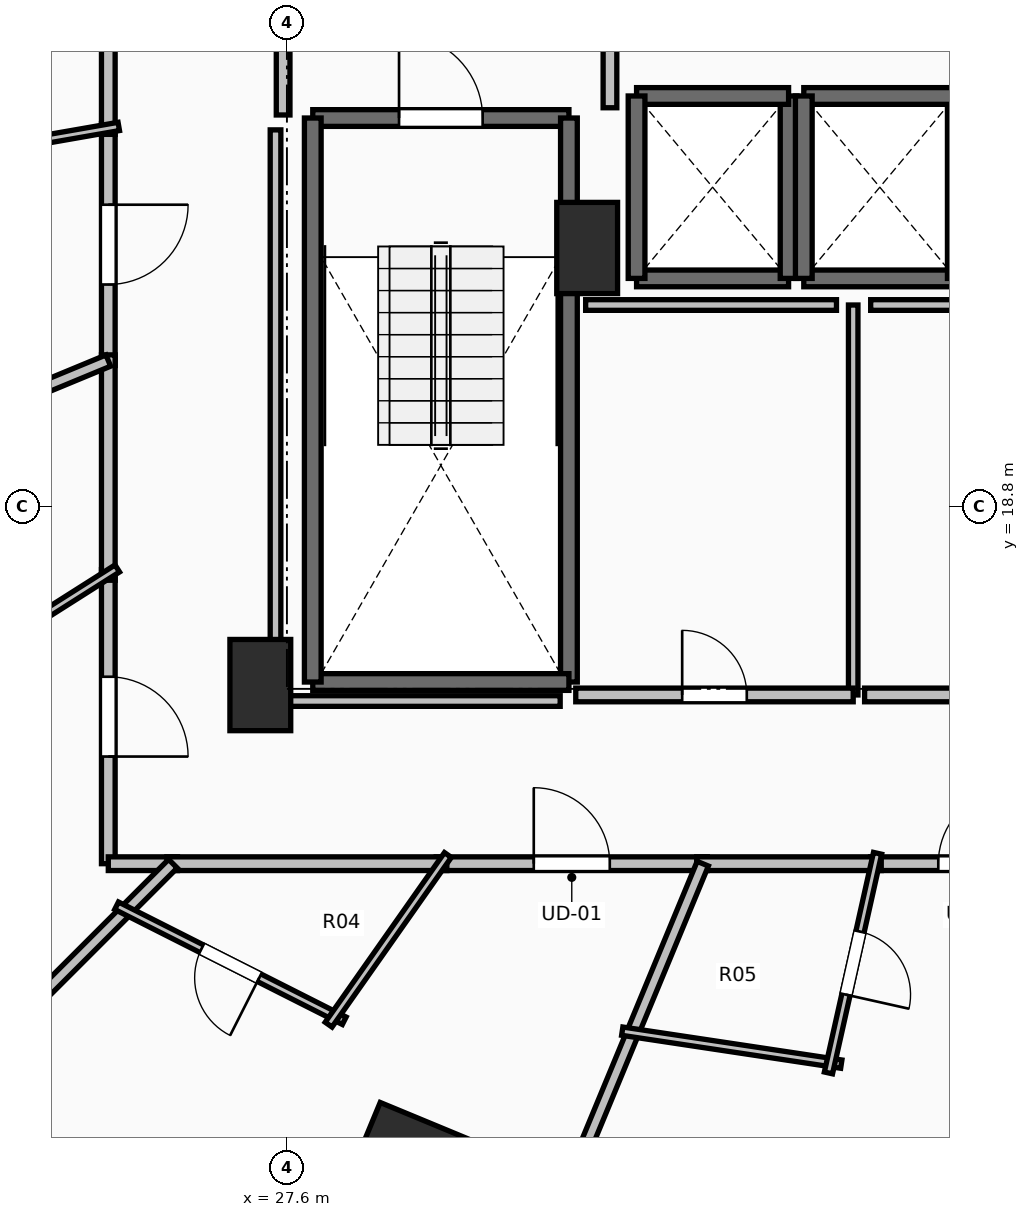
"""IFC4 building model, lengths in metres.
Left out: names, types, materials, properties, quantities, classifications, styles, units other than length and angle.
Written with IfcOpenShell. Run it as: python <this file> out.ifc"""

import sys

from ifc_helpers import new_model, si_unit, direction, frame, frame_2d, origin, origin_2d, place, context, subcontext, project, spatial, rectangle, extrude, element, fill, save


model = new_model("IFC4")
c1 = context("Model", 3, precision=1e-05, world=origin(), true_north=direction((0.0, 1.0)))
c2 = subcontext(c1, "Body", "Model", "MODEL_VIEW")
j1 = project(units=[si_unit("LENGTHUNIT", "METRE"), si_unit("PLANEANGLEUNIT", "RADIAN")], contexts=[c1])
p1 = place(None, origin())
s1 = spatial("IfcSite", under=j1, at=p1, CompositionType="ELEMENT")
p2 = place(p1, origin())
s2 = spatial("IfcBuilding", under=s1, at=p2, CompositionType="ELEMENT")
p3 = place(p2, frame((0.0, 0.0, 31.0)))
s3 = spatial("IfcBuildingStorey", under=s2, at=p3, CompositionType="ELEMENT", Elevation=31.0)
p4 = place(p3, frame((29.179, 10.109, 0.0), z_axis=(0.0, 0.0, 1.0), x_axis=(-0.382683432365, -0.923879532511, 0.0)))
e1 = element("IfcColumn", 1, at=p4, inside=s3, PredefinedType="COLUMN", context=c2, shape_type="SweptSolid", body=[
    extrude(rectangle(XDim=1.3, YDim=1.3, at=origin_2d()), origin(), (0.0, 0.0, 1.0), 3.5),
])
for number, where, z_axis, x_axis in (
    (2, (27.25, 16.45, 0.0), (0.0, 0.0, 1.0), (1.0, 0.0, 0.0)),
    (3, (31.55, 22.2, 0.0), (0.0, 0.0, 1.0), (1.0, 0.0, 0.0)),
):
    element("IfcColumn", number, at=place(p3, frame(where, z_axis=z_axis, x_axis=x_axis)), inside=s3, PredefinedType="PILASTER", context=c2, shape_type="SweptSolid", body=[
        extrude(rectangle(XDim=0.8, YDim=1.2, at=origin_2d()), origin(), (0.0, 0.0, 1.0), 3.5),
    ])
p5 = place(p3, frame((27.94, 23.91, 0.0), z_axis=(0.0, 0.0, 1.0), x_axis=(1.0, 0.0, 0.0)))
e4 = element("IfcWall", 4, at=p5, inside=s3, PredefinedType="SOLIDWALL", context=c2, shape_type="SweptSolid", body=[
    extrude(rectangle(XDim=3.37, YDim=0.22, at=frame_2d((1.685, 0.0))), origin(), (0.0, 0.0, 1.0), 3.24),
])
p6 = place(p5, frame((1.135, 0.0, 0.0)))
e5 = element("IfcOpeningElement", 5, at=p6, cuts=e4, PredefinedType="OPENING", context=c2, shape_type="SweptSolid", body=[
    extrude(rectangle(XDim=1.1, YDim=2.15, at=frame_2d((0.55, 1.075))), frame((0.0, 0.125, 0.0), z_axis=(0.0, -1.0, 0.0), x_axis=(1.0, 0.0, 0.0)), (0.0, 0.0, 1.0), 0.25),
])
p7 = place(p3, frame((31.31, 23.91, 0.0), z_axis=(0.0, 0.0, 1.0), x_axis=(0.0, -1.0, 0.0)))
e6 = element("IfcWall", 6, at=p7, inside=s3, PredefinedType="SOLIDWALL", context=c2, shape_type="SweptSolid", body=[
    extrude(rectangle(XDim=7.42, YDim=0.22, at=frame_2d((3.71, 0.0))), origin(), (0.0, 0.0, 1.0), 3.24),
])
p8 = place(p3, frame((31.31, 16.49, 0.0), z_axis=(0.0, 0.0, 1.0), x_axis=(-1.0, 0.0, 0.0)))
e7 = element("IfcWall", 7, at=p8, inside=s3, PredefinedType="SOLIDWALL", context=c2, shape_type="SweptSolid", body=[
    extrude(rectangle(XDim=3.37, YDim=0.22, at=frame_2d((1.685, 0.0))), origin(), (0.0, 0.0, 1.0), 3.24),
])
p9 = place(p3, frame((27.94, 16.49, 0.0), z_axis=(0.0, 0.0, 1.0), x_axis=(0.0, 1.0, 0.0)))
e8 = element("IfcWall", 8, at=p9, inside=s3, PredefinedType="SOLIDWALL", context=c2, shape_type="SweptSolid", body=[
    extrude(rectangle(XDim=7.42, YDim=0.22, at=frame_2d((3.71, 0.0))), origin(), (0.0, 0.0, 1.0), 3.24),
])
p10 = place(p3, frame((32.2, 21.8, 0.0), z_axis=(0.0, 0.0, 1.0), x_axis=(1.0, 0.0, 0.0)))
e9 = element("IfcWall", 9, at=p10, inside=s3, PredefinedType="SOLIDWALL", context=c2, shape_type="SweptSolid", body=[
    extrude(rectangle(XDim=2.0, YDim=0.22, at=frame_2d((1.0, 0.0))), origin(), (0.0, 0.0, 1.0), 3.24),
])
p11 = place(p3, frame((34.2, 21.8, 0.0), z_axis=(0.0, 0.0, 1.0), x_axis=(0.0, 1.0, 0.0)))
e10 = element("IfcWall", 10, at=p11, inside=s3, PredefinedType="SOLIDWALL", context=c2, shape_type="SweptSolid", body=[
    extrude(rectangle(XDim=2.4, YDim=0.22, at=frame_2d((1.2, 0.0))), origin(), (0.0, 0.0, 1.0), 3.24),
])
p12 = place(p3, frame((34.2, 24.2, 0.0), z_axis=(0.0, 0.0, 1.0), x_axis=(-1.0, 0.0, 0.0)))
e11 = element("IfcWall", 11, at=p12, inside=s3, PredefinedType="SOLIDWALL", context=c2, shape_type="SweptSolid", body=[
    extrude(rectangle(XDim=2.0, YDim=0.22, at=frame_2d((1.0, 0.0))), origin(), (0.0, 0.0, 1.0), 3.24),
])
p13 = place(p3, frame((32.2, 24.2, 0.0), z_axis=(0.0, 0.0, 1.0), x_axis=(0.0, -1.0, 0.0)))
e12 = element("IfcWall", 12, at=p13, inside=s3, PredefinedType="SOLIDWALL", context=c2, shape_type="SweptSolid", body=[
    extrude(rectangle(XDim=2.4, YDim=0.22, at=frame_2d((1.2, 0.0))), origin(), (0.0, 0.0, 1.0), 3.24),
])
p14 = place(p3, frame((34.4, 21.8, 0.0), z_axis=(0.0, 0.0, 1.0), x_axis=(1.0, 0.0, 0.0)))
e13 = element("IfcWall", 13, at=p14, inside=s3, PredefinedType="SOLIDWALL", context=c2, shape_type="SweptSolid", body=[
    extrude(rectangle(XDim=2.0, YDim=0.22, at=frame_2d((1.0, 0.0))), origin(), (0.0, 0.0, 1.0), 3.24),
])
p15 = place(p3, frame((36.4, 21.8, 0.0), z_axis=(0.0, 0.0, 1.0), x_axis=(0.0, 1.0, 0.0)))
e14 = element("IfcWall", 14, at=p15, inside=s3, PredefinedType="SOLIDWALL", context=c2, shape_type="SweptSolid", body=[
    extrude(rectangle(XDim=2.4, YDim=0.22, at=frame_2d((1.2, 0.0))), origin(), (0.0, 0.0, 1.0), 3.24),
])
p16 = place(p3, frame((36.4, 24.2, 0.0), z_axis=(0.0, 0.0, 1.0), x_axis=(-1.0, 0.0, 0.0)))
e15 = element("IfcWall", 15, at=p16, inside=s3, PredefinedType="SOLIDWALL", context=c2, shape_type="SweptSolid", body=[
    extrude(rectangle(XDim=2.0, YDim=0.22, at=frame_2d((1.0, 0.0))), origin(), (0.0, 0.0, 1.0), 3.24),
])
p17 = place(p3, frame((34.4, 24.2, 0.0), z_axis=(0.0, 0.0, 1.0), x_axis=(0.0, -1.0, 0.0)))
e16 = element("IfcWall", 16, at=p17, inside=s3, PredefinedType="SOLIDWALL", context=c2, shape_type="SweptSolid", body=[
    extrude(rectangle(XDim=2.4, YDim=0.22, at=frame_2d((1.2, 0.0))), origin(), (0.0, 0.0, 1.0), 3.24),
])
p18 = place(p3, frame((31.85, 24.045, 0.0), z_axis=(0.0, 0.0, 1.0), x_axis=(0.0, 1.0, 0.0)))
e17 = element("IfcWall", 17, at=p18, inside=s3, PredefinedType="PARTITIONING", context=c2, shape_type="SweptSolid", body=[
    extrude(rectangle(XDim=3.91, YDim=0.18, at=frame_2d((1.955, 0.0))), origin(), (0.0, 0.0, 1.0), 3.24),
])
p19 = place(p18, frame((1.355, 0.0, 0.0)))
e18 = element("IfcOpeningElement", 18, at=p19, cuts=e17, PredefinedType="OPENING", context=c2, shape_type="SweptSolid", body=[
    extrude(rectangle(XDim=1.2, YDim=2.15, at=frame_2d((0.6, 1.075))), frame((0.0, 0.105, 0.0), z_axis=(0.0, -1.0, 0.0), x_axis=(1.0, 0.0, 0.0)), (0.0, 0.0, 1.0), 0.21),
])
p20 = place(p3, frame((27.55, 28.0, 0.0), z_axis=(0.0, 0.0, 1.0), x_axis=(0.0, -1.0, 0.0)))
e19 = element("IfcWall", 19, at=p20, inside=s3, PredefinedType="PARTITIONING", context=c2, shape_type="SweptSolid", body=[
    extrude(rectangle(XDim=4.05, YDim=0.18, at=frame_2d((2.025, 0.0))), origin(), (0.0, 0.0, 1.0), 3.24),
])
p21 = place(p20, frame((1.425, 0.0, 0.0)))
e20 = element("IfcOpeningElement", 20, at=p21, cuts=e19, PredefinedType="OPENING", context=c2, shape_type="SweptSolid", body=[
    extrude(rectangle(XDim=1.2, YDim=2.15, at=frame_2d((0.6, 1.075))), frame((0.0, 0.105, 0.0), z_axis=(0.0, -1.0, 0.0), x_axis=(1.0, 0.0, 0.0)), (0.0, 0.0, 1.0), 0.21),
])
p22 = place(p3, frame((35.05, 16.32, 0.0), z_axis=(0.0, 0.0, 1.0), x_axis=(0.0, 1.0, 0.0)))
e21 = element("IfcWall", 21, at=p22, inside=s3, PredefinedType="PARTITIONING", context=c2, shape_type="SweptSolid", body=[
    extrude(rectangle(XDim=5.13, YDim=0.125, at=frame_2d((2.565, 0.0))), origin(), (0.0, 0.0, 1.0), 3.24),
])
p23 = place(p3, frame((31.4, 16.32, 0.0), z_axis=(0.0, 0.0, 1.0), x_axis=(1.0, 0.0, 0.0)))
e22 = element("IfcWall", 22, at=p23, inside=s3, PredefinedType="PARTITIONING", context=c2, shape_type="SweptSolid", body=[
    extrude(rectangle(XDim=3.65, YDim=0.18, at=frame_2d((1.825, 0.0))), origin(), (0.0, 0.0, 1.0), 3.24),
])
p24 = place(p23, frame((1.4, 0.0, 0.0)))
e23 = element("IfcOpeningElement", 23, at=p24, cuts=e22, PredefinedType="OPENING", context=c2, shape_type="SweptSolid", body=[
    extrude(rectangle(XDim=0.85, YDim=2.1, at=frame_2d((0.425, 1.05))), frame((0.0, 0.105, 0.0), z_axis=(0.0, -1.0, 0.0), x_axis=(1.0, 0.0, 0.0)), (0.0, 0.0, 1.0), 0.21),
])
p25 = place(p3, frame((35.2, 16.32, 0.0), z_axis=(0.0, 0.0, 1.0), x_axis=(1.0, 0.0, 0.0)))
e24 = element("IfcWall", 24, at=p25, inside=s3, PredefinedType="PARTITIONING", context=c2, shape_type="SweptSolid", body=[
    extrude(rectangle(XDim=3.6, YDim=0.18, at=frame_2d((1.8, 0.0))), origin(), (0.0, 0.0, 1.0), 3.24),
])
p26 = place(p25, frame((1.375, 0.0, 0.0)))
e25 = element("IfcOpeningElement", 25, at=p26, cuts=e24, PredefinedType="OPENING", context=c2, shape_type="SweptSolid", body=[
    extrude(rectangle(XDim=0.85, YDim=2.1, at=frame_2d((0.425, 1.05))), frame((0.0, 0.105, 0.0), z_axis=(0.0, -1.0, 0.0), x_axis=(1.0, 0.0, 0.0)), (0.0, 0.0, 1.0), 0.21),
])
p27 = place(p3, frame((25.25, 23.835, 0.0), z_axis=(0.0, 0.0, 1.0), x_axis=(0.0, -1.0, 0.0)))
e26 = element("IfcWall", 26, at=p27, inside=s3, PredefinedType="PARTITIONING", context=c2, shape_type="SweptSolid", body=[
    extrude(rectangle(XDim=3.181, YDim=0.18, at=frame_2d((1.59, 0.0))), origin(), (0.0, 0.0, 1.0), 3.24),
])
p28 = place(p27, frame((1.065, 0.0, 0.0)))
e27 = element("IfcOpeningElement", 27, at=p28, cuts=e26, PredefinedType="OPENING", context=c2, shape_type="SweptSolid", body=[
    extrude(rectangle(XDim=1.05, YDim=2.2, at=frame_2d((0.525, 1.1))), frame((0.0, 0.105, 0.0), z_axis=(0.0, -1.0, 0.0), x_axis=(1.0, 0.0, 0.0)), (0.0, 0.0, 1.0), 0.21),
])
p29 = place(p3, frame((25.25, 26.08, 0.0), z_axis=(0.0, 0.0, 1.0), x_axis=(0.0, -1.0, 0.0)))
e28 = element("IfcWall", 28, at=p29, inside=s3, PredefinedType="PARTITIONING", context=c2, shape_type="SweptSolid", body=[
    extrude(rectangle(XDim=2.385, YDim=0.18, at=frame_2d((1.192, 0.0))), origin(), (0.0, 0.0, 1.0), 3.24),
])
p30 = place(p3, frame((25.25, 17.969, 0.0), z_axis=(0.0, 0.0, 1.0), x_axis=(0.0, -1.0, 0.0)))
e29 = element("IfcWall", 29, at=p30, inside=s3, PredefinedType="PARTITIONING", context=c2, shape_type="SweptSolid", body=[
    extrude(rectangle(XDim=3.869, YDim=0.18, at=frame_2d((1.935, 0.0))), origin(), (0.0, 0.0, 1.0), 2.432),
])
p31 = place(p30, frame((1.409, 0.0, 0.0)))
e30 = element("IfcOpeningElement", 30, at=p31, cuts=e29, PredefinedType="OPENING", context=c2, shape_type="SweptSolid", body=[
    extrude(rectangle(XDim=1.05, YDim=2.2, at=frame_2d((0.525, 1.1))), frame((0.0, 0.105, 0.0), z_axis=(0.0, -1.0, 0.0), x_axis=(1.0, 0.0, 0.0)), (0.0, 0.0, 1.0), 0.21),
])
p32 = place(p3, frame((25.25, 14.1, 0.0), z_axis=(0.0, 0.0, 1.0), x_axis=(1.0, 0.0, 0.0)))
e31 = element("IfcWall", 31, at=p32, inside=s3, PredefinedType="PARTITIONING", context=c2, shape_type="SweptSolid", body=[
    extrude(rectangle(XDim=0.91, YDim=0.18, at=frame_2d((0.455, 0.0))), origin(), (0.0, 0.0, 1.0), 3.24),
])
p33 = place(p3, frame((25.25, 20.794, 0.0), z_axis=(0.0, 0.0, 1.0), x_axis=(0.0, -1.0, 0.0)))
e32 = element("IfcWall", 32, at=p33, inside=s3, PredefinedType="PARTITIONING", context=c2, shape_type="SweptSolid", body=[
    extrude(rectangle(XDim=2.965, YDim=0.18, at=frame_2d((1.482, 0.0))), origin(), (0.0, 0.0, 1.0), 3.24),
])
p34 = place(p3, frame((29.564, 14.1, 0.0), z_axis=(0.0, 0.0, 1.0), x_axis=(1.0, 0.0, 0.0)))
e33 = element("IfcWall", 33, at=p34, inside=s3, PredefinedType="PARTITIONING", context=c2, shape_type="SweptSolid", body=[
    extrude(rectangle(XDim=3.567, YDim=0.18, at=frame_2d((1.784, 0.0))), origin(), (0.0, 0.0, 1.0), 3.24),
])
p35 = place(p34, frame((1.283, 0.0, 0.0)))
e34 = element("IfcOpeningElement", 34, at=p35, cuts=e33, PredefinedType="OPENING", context=c2, shape_type="SweptSolid", body=[
    extrude(rectangle(XDim=1.0, YDim=2.15, at=frame_2d((0.5, 1.075))), frame((0.0, 0.105, 0.0), z_axis=(0.0, -1.0, 0.0), x_axis=(1.0, 0.0, 0.0)), (0.0, 0.0, 1.0), 0.21),
])
p36 = place(p3, frame((26.02, 14.1, 0.0), z_axis=(0.0, 0.0, 1.0), x_axis=(1.0, 0.0, 0.0)))
e35 = element("IfcWall", 35, at=p36, inside=s3, PredefinedType="PARTITIONING", context=c2, shape_type="SweptSolid", body=[
    extrude(rectangle(XDim=3.684, YDim=0.18, at=frame_2d((1.842, 0.0))), origin(), (0.0, 0.0, 1.0), 2.432),
])
p37 = place(p3, frame((35.279, 14.1, 0.0), z_axis=(0.0, 0.0, 1.0), x_axis=(1.0, 0.0, 0.0)))
e36 = element("IfcWall", 36, at=p37, inside=s3, PredefinedType="PARTITIONING", context=c2, shape_type="SweptSolid", body=[
    extrude(rectangle(XDim=2.781, YDim=0.18, at=frame_2d((1.391, 0.0))), origin(), (0.0, 0.0, 1.0), 3.24),
])
p38 = place(p37, frame((0.89, 0.0, 0.0)))
e37 = element("IfcOpeningElement", 37, at=p38, cuts=e36, PredefinedType="OPENING", context=c2, shape_type="SweptSolid", body=[
    extrude(rectangle(XDim=1.0, YDim=2.15, at=frame_2d((0.5, 1.075))), frame((0.0, 0.105, 0.0), z_axis=(0.0, -1.0, 0.0), x_axis=(1.0, 0.0, 0.0)), (0.0, 0.0, 1.0), 0.21),
])
p39 = place(p3, frame((32.991, 14.1, 0.0), z_axis=(0.0, 0.0, 1.0), x_axis=(1.0, 0.0, 0.0)))
e38 = element("IfcWall", 38, at=p39, inside=s3, PredefinedType="PARTITIONING", context=c2, shape_type="SweptSolid", body=[
    extrude(rectangle(XDim=2.428, YDim=0.18, at=frame_2d((1.214, 0.0))), origin(), (0.0, 0.0, 1.0), 3.24),
])
p40 = place(p3, frame((25.388, 23.799, 0.0), z_axis=(0.0, 0.0, 1.0), x_axis=(-0.985100697644, -0.171978532096, 0.0)))
e39 = element("IfcWall", 39, at=p40, inside=s3, PredefinedType="PARTITIONING", context=c2, shape_type="SweptSolid", body=[
    extrude(rectangle(XDim=5.351, YDim=0.11, at=frame_2d((2.675, 0.0))), origin(), (0.0, 0.0, 1.0), 2.922),
])
p41 = place(p40, frame((2.25, 0.0, 0.0)))
e40 = element("IfcOpeningElement", 40, at=p41, cuts=e39, PredefinedType="OPENING", context=c2, shape_type="SweptSolid", body=[
    extrude(rectangle(XDim=0.85, YDim=2.1, at=frame_2d((0.425, 1.05))), frame((0.0, 0.07, 0.0), z_axis=(0.0, -1.0, 0.0), x_axis=(1.0, 0.0, 0.0)), (0.0, 0.0, 1.0), 0.14),
])
p42 = place(p3, frame((12.207, 15.316, 0.0), z_axis=(0.0, 0.0, 1.0), x_axis=(0.923866969846, 0.382713759914, 0.0)))
e41 = element("IfcWall", 41, at=p42, inside=s3, PredefinedType="PARTITIONING", context=c2, shape_type="SweptSolid", body=[
    extrude(rectangle(XDim=14.118, YDim=0.16, at=frame_2d((7.059, 0.0))), origin(), (0.0, 0.0, 1.0), 2.432),
])
p43 = place(p3, frame((25.368, 17.984, 0.0), z_axis=(0.0, 0.0, 1.0), x_axis=(-0.844361394482, -0.535774052665, 0.0)))
e42 = element("IfcWall", 42, at=p43, inside=s3, PredefinedType="PARTITIONING", context=c2, shape_type="SweptSolid", body=[
    extrude(rectangle(XDim=1.793, YDim=0.11, at=frame_2d((0.897, 0.0))), origin(), (0.0, 0.0, 1.0), 2.432),
])
p44 = place(p3, frame((20.247, 8.247, 0.0), z_axis=(0.0, 0.0, 1.0), x_axis=(0.707106781187, 0.707106781187, 0.0)))
e43 = element("IfcWall", 43, at=p44, inside=s3, PredefinedType="PARTITIONING", context=c2, shape_type="SweptSolid", body=[
    extrude(rectangle(XDim=8.277, YDim=0.16, at=frame_2d((4.139, 0.0))), origin(), (0.0, 0.0, 1.0), 2.624),
])
p45 = place(p3, frame((28.354, 12.034, 0.0), z_axis=(0.0, 0.0, 1.0), x_axis=(-0.892556909034, 0.450934767052, 0.0)))
e44 = element("IfcWall", 44, at=p45, inside=s3, PredefinedType="PARTITIONING", context=c2, shape_type="SweptSolid", body=[
    extrude(rectangle(XDim=3.356, YDim=0.11, at=frame_2d((1.678, 0.0))), origin(), (0.0, 0.0, 1.0), 2.432),
])
p46 = place(p45, frame((1.253, 0.0, 0.0)))
e45 = element("IfcOpeningElement", 45, at=p46, cuts=e44, PredefinedType="OPENING", context=c2, shape_type="SweptSolid", body=[
    extrude(rectangle(XDim=0.85, YDim=2.1, at=frame_2d((0.425, 1.05))), frame((0.0, 0.07, 0.0), z_axis=(0.0, -1.0, 0.0), x_axis=(1.0, 0.0, 0.0)), (0.0, 0.0, 1.0), 0.14),
])
p47 = place(p3, frame((29.718, 14.215, 0.0), z_axis=(0.0, 0.0, 1.0), x_axis=(-0.575076641985, -0.81809953908, 0.0)))
e46 = element("IfcWall", 46, at=p47, inside=s3, PredefinedType="PARTITIONING", context=c2, shape_type="SweptSolid", body=[
    extrude(rectangle(XDim=2.729, YDim=0.11, at=frame_2d((1.364, 0.0))), origin(), (0.0, 0.0, 1.0), 2.432),
])
p48 = place(p3, frame((29.208, 4.775, 0.0), z_axis=(0.0, 0.0, 1.0), x_axis=(0.382718503749, 0.923865004689, 0.0)))
e47 = element("IfcWall", 47, at=p48, inside=s3, PredefinedType="PARTITIONING", context=c2, shape_type="SweptSolid", body=[
    extrude(rectangle(XDim=10.094, YDim=0.16, at=frame_2d((5.047, 0.0))), origin(), (0.0, 0.0, 1.0), 2.432),
])
p49 = place(p3, frame((34.893, 11.463, 0.0), z_axis=(0.0, 0.0, 1.0), x_axis=(-0.988868035357, 0.148795190273, 0.0)))
e48 = element("IfcWall", 48, at=p49, inside=s3, PredefinedType="PARTITIONING", context=c2, shape_type="SweptSolid", body=[
    extrude(rectangle(XDim=2.914, YDim=0.11, at=frame_2d((1.457, 0.0))), origin(), (0.0, 0.0, 1.0), 3.24),
])
p50 = place(p3, frame((35.371, 14.237, 0.0), z_axis=(0.0, 0.0, 1.0), x_axis=(-0.218283637967, -0.975885368983, 0.0)))
e49 = element("IfcWall", 49, at=p50, inside=s3, PredefinedType="PARTITIONING", context=c2, shape_type="SweptSolid", body=[
    extrude(rectangle(XDim=2.96, YDim=0.11, at=frame_2d((1.48, 0.0))), origin(), (0.0, 0.0, 1.0), 2.922),
])
p51 = place(p50, frame((1.055, 0.0, 0.0)))
e50 = element("IfcOpeningElement", 50, at=p51, cuts=e49, PredefinedType="OPENING", context=c2, shape_type="SweptSolid", body=[
    extrude(rectangle(XDim=0.85, YDim=2.1, at=frame_2d((0.425, 1.05))), frame((0.0, 0.07, 0.0), z_axis=(0.0, -1.0, 0.0), x_axis=(1.0, 0.0, 0.0)), (0.0, 0.0, 1.0), 0.14),
])
p52 = place(p3, frame((34.83, 21.45, 0.0), z_axis=(0.0, 0.0, 1.0), x_axis=(-1.0, 0.0, 0.0)))
e51 = element("IfcWall", 51, at=p52, inside=s3, PredefinedType="PARTITIONING", context=c2, shape_type="SweptSolid", body=[
    extrude(rectangle(XDim=3.3, YDim=0.14, at=frame_2d((1.65, 0.0))), origin(), (0.0, 0.0, 1.0), 3.24),
])
p53 = place(p3, frame((36.439, 21.45, 0.0), z_axis=(0.0, 0.0, 1.0), x_axis=(-1.0, 0.0, 0.0)))
e52 = element("IfcWall", 52, at=p53, inside=s3, PredefinedType="PARTITIONING", context=c2, shape_type="SweptSolid", body=[
    extrude(rectangle(XDim=1.159, YDim=0.14, at=frame_2d((0.58, 0.0))), origin(), (0.0, 0.0, 1.0), 3.24),
])
p54 = place(p3, frame((31.195, 16.24, 0.0), z_axis=(0.0, 0.0, 1.0), x_axis=(-1.0, 0.0, 0.0)))
e53 = element("IfcWall", 53, at=p54, inside=s3, PredefinedType="PARTITIONING", context=c2, shape_type="SweptSolid", body=[
    extrude(rectangle(XDim=3.745, YDim=0.14, at=frame_2d((1.873, 0.0))), origin(), (0.0, 0.0, 1.0), 2.432),
])
p55 = place(p3, frame((27.45, 16.24, 0.0), z_axis=(0.0, 0.0, 1.0), x_axis=(0.0, 1.0, 0.0)))
e54 = element("IfcWall", 54, at=p55, inside=s3, PredefinedType="PARTITIONING", context=c2, shape_type="SweptSolid", body=[
    extrude(rectangle(XDim=7.514, YDim=0.14, at=frame_2d((3.757, 0.0))), origin(), (0.0, 0.0, 1.0), 2.432),
])
p56 = place(p6, origin())
e55 = element("IfcDoor", 55, at=p56, inside=s3, OperationType="SINGLE_SWING_LEFT", PredefinedType="DOOR", context=c2, shape_type="SweptSolid", body=[
    extrude(rectangle(XDim=1.1, YDim=2.15, at=frame_2d((0.55, 1.075))), frame((0.0, 0.025, 0.0), z_axis=(0.0, -1.0, 0.0), x_axis=(1.0, 0.0, 0.0)), (0.0, 0.0, 1.0), 0.05),
])
fill(e5, e55)
p57 = place(p24, origin())
e56 = element("IfcDoor", 56, at=p57, inside=s3, OperationType="SINGLE_SWING_LEFT", PredefinedType="DOOR", context=c2, shape_type="SweptSolid", body=[
    extrude(rectangle(XDim=0.85, YDim=2.1, at=frame_2d((0.425, 1.05))), frame((0.0, 0.025, 0.0), z_axis=(0.0, -1.0, 0.0), x_axis=(1.0, 0.0, 0.0)), (0.0, 0.0, 1.0), 0.05),
])
fill(e23, e56)
p58 = place(p28, origin())
e57 = element("IfcDoor", 57, at=p58, inside=s3, OperationType="SINGLE_SWING_LEFT", PredefinedType="DOOR", context=c2, shape_type="SweptSolid", body=[
    extrude(rectangle(XDim=1.05, YDim=2.2, at=frame_2d((0.525, 1.1))), frame((0.0, 0.025, 0.0), z_axis=(0.0, -1.0, 0.0), x_axis=(1.0, 0.0, 0.0)), (0.0, 0.0, 1.0), 0.05),
])
fill(e27, e57)
p59 = place(p31, origin())
e58 = element("IfcDoor", 58, at=p59, inside=s3, OperationType="SINGLE_SWING_RIGHT", PredefinedType="DOOR", context=c2, shape_type="SweptSolid", body=[
    extrude(rectangle(XDim=1.05, YDim=2.2, at=frame_2d((0.525, 1.1))), frame((0.0, 0.025, 0.0), z_axis=(0.0, -1.0, 0.0), x_axis=(1.0, 0.0, 0.0)), (0.0, 0.0, 1.0), 0.05),
])
fill(e30, e58)
p60 = place(p35, origin())
e59 = element("IfcDoor", 59, at=p60, inside=s3, OperationType="SINGLE_SWING_LEFT", PredefinedType="DOOR", context=c2, shape_type="SweptSolid", body=[
    extrude(rectangle(XDim=1.0, YDim=2.15, at=frame_2d((0.5, 1.075))), frame((0.0, 0.025, 0.0), z_axis=(0.0, -1.0, 0.0), x_axis=(1.0, 0.0, 0.0)), (0.0, 0.0, 1.0), 0.05),
])
fill(e34, e59)
p61 = place(p38, origin())
e60 = element("IfcDoor", 60, at=p61, inside=s3, OperationType="SINGLE_SWING_RIGHT", PredefinedType="DOOR", context=c2, shape_type="SweptSolid", body=[
    extrude(rectangle(XDim=1.0, YDim=2.15, at=frame_2d((0.5, 1.075))), frame((0.0, 0.025, 0.0), z_axis=(0.0, -1.0, 0.0), x_axis=(1.0, 0.0, 0.0)), (0.0, 0.0, 1.0), 0.05),
])
fill(e37, e60)
p62 = place(p46, origin())
e61 = element("IfcDoor", 61, at=p62, inside=s3, OperationType="SINGLE_SWING_LEFT", PredefinedType="DOOR", context=c2, shape_type="SweptSolid", body=[
    extrude(rectangle(XDim=0.85, YDim=2.1, at=frame_2d((0.425, 1.05))), frame((0.0, 0.025, 0.0), z_axis=(0.0, -1.0, 0.0), x_axis=(1.0, 0.0, 0.0)), (0.0, 0.0, 1.0), 0.05),
])
fill(e45, e61)
p63 = place(p51, origin())
e62 = element("IfcDoor", 62, at=p63, inside=s3, OperationType="SINGLE_SWING_RIGHT", PredefinedType="DOOR", context=c2, shape_type="SweptSolid", body=[
    extrude(rectangle(XDim=0.85, YDim=2.1, at=frame_2d((0.425, 1.05))), frame((0.0, 0.025, 0.0), z_axis=(0.0, -1.0, 0.0), x_axis=(1.0, 0.0, 0.0)), (0.0, 0.0, 1.0), 0.05),
])
fill(e50, e62)
save(model, sys.argv[1])
